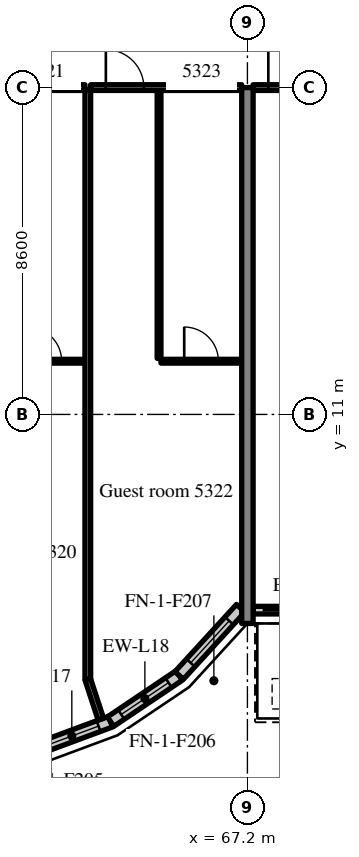
"""IFC4 building model, lengths in metres.
Left out: names, types, materials, properties, quantities, classifications, styles, units other than length and angle.
Written with IfcOpenShell. Run it as: python <this file> out.ifc"""

import sys

from ifc_helpers import new_model, si_unit, direction, frame, frame_2d, origin, place, context, subcontext, project, spatial, rectangle, extrude, source, transform, mapped, element, fill, save


model = new_model("IFC4")
c1 = context("Model", 3, precision=1e-05, world=origin(), true_north=direction((0.0, 1.0)))
c2 = subcontext(c1, "Body", "Model", "MODEL_VIEW")
j1 = project(units=[si_unit("LENGTHUNIT", "METRE"), si_unit("PLANEANGLEUNIT", "RADIAN")], contexts=[c1])
p1 = place(None, origin())
s1 = spatial("IfcSite", under=j1, at=p1, CompositionType="ELEMENT")
p2 = place(p1, origin())
s2 = spatial("IfcBuilding", under=s1, at=p2, CompositionType="ELEMENT")
p3 = place(p2, frame((0.0, 0.0, 221.8)))
s3 = spatial("IfcBuildingStorey", under=s2, at=p3, CompositionType="ELEMENT", Elevation=221.8)
m1 = source(origin(), c2, "Body", "SweptSolid", [
    extrude(rectangle(XDim=14.1, YDim=0.3, at=frame_2d((7.05, 0.0))), origin(), (0.0, 0.0, 1.0), 3.62),
])
p4 = place(p3, frame((67.2, 5.5, 0.0), z_axis=(0.0, 0.0, 1.0), x_axis=(0.0, 1.0, 0.0)))
e1 = element("IfcWall", 1, at=p4, inside=s3, PredefinedType="SHEAR", context=c2, shape_type="MappedRepresentation", body=[
    mapped(m1, transform((0.0, 0.0, 0.0), scale=1.0)),
])
m2 = source(origin(), c2, "Body", "SweptSolid", [
    extrude(rectangle(XDim=2.176, YDim=0.3, at=frame_2d((1.088, 0.0))), origin(), (0.0, 0.0, 1.0), 3.62),
])
p5 = place(p3, frame((61.56, 2.16, 0.0), z_axis=(0.0, 0.0, 1.0), x_axis=(0.937531979054, 0.347899106424, 0.0)))
e2 = element("IfcWall", 2, at=p5, inside=s3, PredefinedType="SOLIDWALL", context=c2, shape_type="MappedRepresentation", body=[
    mapped(m2, transform((0.0, 0.0, 0.0), scale=1.0)),
])
m3 = source(origin(), c2, "Body", "SweptSolid", [
    extrude(rectangle(XDim=1.5, YDim=2.0, at=frame_2d((0.75, 1.0))), frame((0.0, 0.16, 0.0), z_axis=(0.0, -1.0, 0.0), x_axis=(1.0, 0.0, 0.0)), (0.0, 0.0, 1.0), 0.32),
])
p6 = place(p5, frame((0.338, 0.0, 0.9)))
e3 = element("IfcOpeningElement", 3, at=p6, cuts=e2, PredefinedType="OPENING", context=c2, shape_type="MappedRepresentation", body=[
    mapped(m3, transform((0.0, 0.0, 0.0), scale=1.0)),
])
m4 = source(origin(), c2, "Body", "SweptSolid", [
    extrude(rectangle(XDim=2.176, YDim=0.3, at=frame_2d((1.088, 0.0))), origin(), (0.0, 0.0, 1.0), 3.62),
])
p7 = place(p3, frame((63.599, 2.917, 0.0), z_axis=(0.0, 0.0, 1.0), x_axis=(0.829625727223, 0.558319937607, 0.0)))
e4 = element("IfcWall", 4, at=p7, inside=s3, PredefinedType="SOLIDWALL", context=c2, shape_type="MappedRepresentation", body=[
    mapped(m4, transform((0.0, 0.0, 0.0), scale=1.0)),
])
p8 = place(p7, frame((0.338, 0.0, 0.9)))
e5 = element("IfcOpeningElement", 5, at=p8, cuts=e4, PredefinedType="OPENING", context=c2, shape_type="MappedRepresentation", body=[
    mapped(m3, transform((0.0, 0.0, 0.0), scale=1.0)),
])
m5 = source(origin(), c2, "Body", "SweptSolid", [
    extrude(rectangle(XDim=2.398, YDim=0.3, at=frame_2d((1.199, 0.0))), origin(), (0.0, 0.0, 1.0), 3.62),
])
p9 = place(p3, frame((65.404, 4.131, 0.0), z_axis=(0.0, 0.0, 1.0), x_axis=(0.675374189419, 0.737475222815, 0.0)))
e6 = element("IfcWall", 6, at=p9, inside=s3, PredefinedType="SOLIDWALL", context=c2, shape_type="MappedRepresentation", body=[
    mapped(m5, transform((0.0, 0.0, 0.0), scale=1.0)),
])
p10 = place(p9, frame((0.449, 0.0, 0.9)))
e7 = element("IfcOpeningElement", 7, at=p10, cuts=e6, PredefinedType="OPENING", context=c2, shape_type="MappedRepresentation", body=[
    mapped(m3, transform((0.0, 0.0, 0.0), scale=1.0)),
])
m6 = source(origin(), c2, "Body", "SweptSolid", [
    extrude(rectangle(XDim=8.1, YDim=0.2, at=frame_2d((4.05, 0.0))), origin(), (0.0, 0.0, 1.0), 3.02),
])
p11 = place(p3, frame((67.35, 5.85, 0.0), z_axis=(0.0, 0.0, 1.0), x_axis=(1.0, 0.0, 0.0)))
e8 = element("IfcWall", 8, at=p11, inside=s3, PredefinedType="SOLIDWALL", context=c2, shape_type="MappedRepresentation", body=[
    mapped(m6, transform((0.0, 0.0, 0.0), scale=1.0)),
])
m7 = source(origin(), c2, "Body", "SweptSolid", [
    extrude(rectangle(XDim=1.2, YDim=2.4, at=frame_2d((0.6, 1.2))), frame((0.0, 0.11, 0.0), z_axis=(0.0, -1.0, 0.0), x_axis=(1.0, 0.0, 0.0)), (0.0, 0.0, 1.0), 0.22),
])
p12 = place(p11, frame((0.25, 0.0, 0.0)))
e9 = element("IfcOpeningElement", 9, at=p12, cuts=e8, PredefinedType="OPENING", context=c2, shape_type="MappedRepresentation", body=[
    mapped(m7, transform((0.0, 0.0, 0.0), scale=1.0)),
])
m8 = source(origin(), c2, "Body", "SweptSolid", [
    extrude(rectangle(XDim=1.5, YDim=1.5, at=frame_2d((0.75, 0.75))), frame((0.0, 0.11, 0.0), z_axis=(0.0, -1.0, 0.0), x_axis=(1.0, 0.0, 0.0)), (0.0, 0.0, 1.0), 0.22),
])
p13 = place(p11, frame((2.3, 0.0, 0.9)))
e10 = element("IfcOpeningElement", 10, at=p13, cuts=e8, PredefinedType="OPENING", context=c2, shape_type="MappedRepresentation", body=[
    mapped(m8, transform((0.0, 0.0, 0.0), scale=1.0)),
])
p14 = place(p11, frame((4.3, 0.0, 0.0)))
e11 = element("IfcOpeningElement", 11, at=p14, cuts=e8, PredefinedType="OPENING", context=c2, shape_type="MappedRepresentation", body=[
    mapped(m7, transform((0.0, 0.0, 0.0), scale=1.0)),
])
p15 = place(p11, frame((6.35, 0.0, 0.9)))
e12 = element("IfcOpeningElement", 12, at=p15, cuts=e8, PredefinedType="OPENING", context=c2, shape_type="MappedRepresentation", body=[
    mapped(m8, transform((0.0, 0.0, 0.0), scale=1.0)),
])
m9 = source(origin(), c2, "Body", "SweptSolid", [
    extrude(rectangle(XDim=2.125, YDim=0.1, at=frame_2d((1.062, 0.0))), origin(), (0.0, 0.0, 1.0), 3.62),
])
p16 = place(p3, frame((60.8, 12.4, 0.0), z_axis=(0.0, 0.0, 1.0), x_axis=(1.0, 0.0, 0.0)))
e13 = element("IfcWall", 13, at=p16, inside=s3, PredefinedType="PARTITIONING", context=c2, shape_type="MappedRepresentation", body=[
    mapped(m9, transform((0.0, 0.0, 0.0), scale=1.0)),
])
m10 = source(origin(), c2, "Body", "SweptSolid", [
    extrude(rectangle(XDim=0.9, YDim=2.1, at=frame_2d((0.45, 1.05))), frame((0.0, 0.06, 0.0), z_axis=(0.0, -1.0, 0.0), x_axis=(1.0, 0.0, 0.0)), (0.0, 0.0, 1.0), 0.12),
])
p17 = place(p16, frame((0.612, 0.0, 0.0)))
e14 = element("IfcOpeningElement", 14, at=p17, cuts=e13, PredefinedType="OPENING", context=c2, shape_type="MappedRepresentation", body=[
    mapped(m10, transform((0.0, 0.0, 0.0), scale=1.0)),
])
m11 = source(origin(), c2, "Body", "SweptSolid", [
    extrude(rectangle(XDim=3.975, YDim=0.15, at=frame_2d((1.988, 0.0))), origin(), (0.0, 0.0, 1.0), 2.92),
])
p18 = place(p3, frame((58.95, 19.6, 0.0), z_axis=(0.0, 0.0, 1.0), x_axis=(1.0, 0.0, 0.0)))
e15 = element("IfcWall", 15, at=p18, inside=s3, PredefinedType="PARTITIONING", context=c2, shape_type="MappedRepresentation", body=[
    mapped(m11, transform((0.0, 0.0, 0.0), scale=1.0)),
])
m12 = source(origin(), c2, "Body", "SweptSolid", [
    extrude(rectangle(XDim=1.0, YDim=2.1, at=frame_2d((0.5, 1.05))), frame((0.0, 0.085, 0.0), z_axis=(0.0, -1.0, 0.0), x_axis=(1.0, 0.0, 0.0)), (0.0, 0.0, 1.0), 0.17),
])
p19 = place(p18, frame((0.4, 0.0, 0.0)))
e16 = element("IfcOpeningElement", 16, at=p19, cuts=e15, PredefinedType="OPENING", context=c2, shape_type="MappedRepresentation", body=[
    mapped(m12, transform((0.0, 0.0, 0.0), scale=1.0)),
])
m13 = source(origin(), c2, "Body", "SweptSolid", [
    extrude(rectangle(XDim=7.05, YDim=0.1, at=frame_2d((3.525, 0.0))), origin(), (0.0, 0.0, 1.0), 3.62),
])
p20 = place(p3, frame((64.875, 12.475, 0.0), z_axis=(0.0, 0.0, 1.0), x_axis=(0.0, 1.0, 0.0)))
e17 = element("IfcWall", 17, at=p20, inside=s3, PredefinedType="PARTITIONING", context=c2, shape_type="MappedRepresentation", body=[
    mapped(m13, transform((0.0, 0.0, 0.0), scale=1.0)),
])
p21 = place(p3, frame((64.925, 12.4, 0.0), z_axis=(0.0, 0.0, 1.0), x_axis=(1.0, 0.0, 0.0)))
e18 = element("IfcWall", 18, at=p21, inside=s3, PredefinedType="PARTITIONING", context=c2, shape_type="MappedRepresentation", body=[
    mapped(m9, transform((0.0, 0.0, 0.0), scale=1.0)),
])
p22 = place(p21, frame((0.612, 0.0, 0.0)))
e19 = element("IfcOpeningElement", 19, at=p22, cuts=e18, PredefinedType="OPENING", context=c2, shape_type="MappedRepresentation", body=[
    mapped(m10, transform((0.0, 0.0, 0.0), scale=1.0)),
])
p23 = place(p3, frame((63.075, 19.6, 0.0), z_axis=(0.0, 0.0, 1.0), x_axis=(1.0, 0.0, 0.0)))
e20 = element("IfcWall", 20, at=p23, inside=s3, PredefinedType="PARTITIONING", context=c2, shape_type="MappedRepresentation", body=[
    mapped(m11, transform((0.0, 0.0, 0.0), scale=1.0)),
])
p24 = place(p23, frame((0.4, 0.0, 0.0)))
e21 = element("IfcOpeningElement", 21, at=p24, cuts=e20, PredefinedType="OPENING", context=c2, shape_type="MappedRepresentation", body=[
    mapped(m12, transform((0.0, 0.0, 0.0), scale=1.0)),
])
m14 = source(origin(), c2, "Body", "SweptSolid", [
    extrude(rectangle(XDim=15.498, YDim=0.15, at=frame_2d((7.749, 0.0))), origin(), (0.0, 0.0, 1.0), 3.62),
])
p25 = place(p3, frame((63.0, 4.027, 0.0), z_axis=(0.0, 0.0, 1.0), x_axis=(0.0, 1.0, 0.0)))
e22 = element("IfcWall", 22, at=p25, inside=s3, PredefinedType="PARTITIONING", context=c2, shape_type="MappedRepresentation", body=[
    mapped(m14, transform((0.0, 0.0, 0.0), scale=1.0)),
])
m15 = source(origin(), c2, "Body", "SweptSolid", [
    extrude(rectangle(XDim=3.975, YDim=0.15, at=frame_2d((1.987, 0.0))), origin(), (0.0, 0.0, 1.0), 2.92),
])
p26 = place(p3, frame((67.35, 19.6, 0.0), z_axis=(0.0, 0.0, 1.0), x_axis=(1.0, 0.0, 0.0)))
e23 = element("IfcWall", 23, at=p26, inside=s3, PredefinedType="PARTITIONING", context=c2, shape_type="MappedRepresentation", body=[
    mapped(m15, transform((0.0, 0.0, 0.0), scale=1.0)),
])
p27 = place(p26, frame((0.4, 0.0, 0.0)))
e24 = element("IfcOpeningElement", 24, at=p27, cuts=e23, PredefinedType="OPENING", context=c2, shape_type="MappedRepresentation", body=[
    mapped(m12, transform((0.0, 0.0, 0.0), scale=1.0)),
])
m16 = source(origin(), c2, "Body", "SweptSolid", [
    extrude(rectangle(XDim=1.101, YDim=0.15, at=frame_2d((0.55, 0.0))), origin(), (0.0, 0.0, 1.0), 3.62),
])
p28 = place(p3, frame((63.343, 2.981, 0.0), z_axis=(0.0, 0.0, 1.0), x_axis=(-0.311567081539, 0.950224159712, 0.0)))
e25 = element("IfcWall", 25, at=p28, inside=s3, PredefinedType="PARTITIONING", context=c2, shape_type="MappedRepresentation", body=[
    mapped(m16, transform((0.0, 0.0, 0.0), scale=1.0)),
])
m17 = source(origin(), c2, "Body", "SweptSolid", [
    extrude(rectangle(XDim=1.5, YDim=2.0, at=frame_2d((0.75, 1.0))), frame((0.0, 0.03, 0.0), z_axis=(0.0, -1.0, 0.0), x_axis=(1.0, 0.0, 0.0)), (0.0, 0.0, 1.0), 0.06),
])
p29 = place(p6, origin())
e26 = element("IfcWindow", 26, at=p29, inside=s3, PartitioningType="SINGLE_PANEL", PredefinedType="WINDOW", context=c2, shape_type="MappedRepresentation", body=[
    mapped(m17, transform((0.0, 0.0, 0.0), scale=1.0)),
])
fill(e3, e26)
p30 = place(p8, origin())
e27 = element("IfcWindow", 27, at=p30, inside=s3, PartitioningType="SINGLE_PANEL", PredefinedType="WINDOW", context=c2, shape_type="MappedRepresentation", body=[
    mapped(m17, transform((0.0, 0.0, 0.0), scale=1.0)),
])
fill(e5, e27)
p31 = place(p10, origin())
e28 = element("IfcWindow", 28, at=p31, inside=s3, PartitioningType="SINGLE_PANEL", PredefinedType="WINDOW", context=c2, shape_type="MappedRepresentation", body=[
    mapped(m17, transform((0.0, 0.0, 0.0), scale=1.0)),
])
fill(e7, e28)
m18 = source(origin(), c2, "Body", "SweptSolid", [
    extrude(rectangle(XDim=1.2, YDim=2.4, at=frame_2d((0.6, 1.2))), frame((0.0, 0.025, 0.0), z_axis=(0.0, -1.0, 0.0), x_axis=(1.0, 0.0, 0.0)), (0.0, 0.0, 1.0), 0.05),
])
p32 = place(p12, origin())
e29 = element("IfcDoor", 29, at=p32, inside=s3, OperationType="SLIDING_TO_LEFT", PredefinedType="DOOR", context=c2, shape_type="MappedRepresentation", body=[
    mapped(m18, transform((0.0, 0.0, 0.0), scale=1.0)),
])
fill(e9, e29)
m19 = source(origin(), c2, "Body", "SweptSolid", [
    extrude(rectangle(XDim=0.9, YDim=2.1, at=frame_2d((0.45, 1.05))), frame((0.0, 0.025, 0.0), z_axis=(0.0, -1.0, 0.0), x_axis=(1.0, 0.0, 0.0)), (0.0, 0.0, 1.0), 0.05),
])
p33 = place(p17, origin())
e30 = element("IfcDoor", 30, at=p33, inside=s3, OperationType="SINGLE_SWING_LEFT", PredefinedType="DOOR", context=c2, shape_type="MappedRepresentation", body=[
    mapped(m19, transform((0.0, 0.0, 0.0), scale=1.0)),
])
fill(e14, e30)
p34 = place(p22, origin())
e31 = element("IfcDoor", 31, at=p34, inside=s3, OperationType="SINGLE_SWING_LEFT", PredefinedType="DOOR", context=c2, shape_type="MappedRepresentation", body=[
    mapped(m19, transform((0.0, 0.0, 0.0), scale=1.0)),
])
fill(e19, e31)
m20 = source(origin(), c2, "Body", "SweptSolid", [
    extrude(rectangle(XDim=1.0, YDim=2.1, at=frame_2d((0.5, 1.05))), frame((0.0, 0.025, 0.0), z_axis=(0.0, -1.0, 0.0), x_axis=(1.0, 0.0, 0.0)), (0.0, 0.0, 1.0), 0.05),
])
p35 = place(p24, origin())
e32 = element("IfcDoor", 32, at=p35, inside=s3, OperationType="SINGLE_SWING_LEFT", PredefinedType="DOOR", context=c2, shape_type="MappedRepresentation", body=[
    mapped(m20, transform((0.0, 0.0, 0.0), scale=1.0)),
])
fill(e21, e32)
p36 = place(p27, origin())
e33 = element("IfcDoor", 33, at=p36, inside=s3, OperationType="SINGLE_SWING_LEFT", PredefinedType="DOOR", context=c2, shape_type="MappedRepresentation", body=[
    mapped(m20, transform((0.0, 0.0, 0.0), scale=1.0)),
])
fill(e24, e33)
save(model, sys.argv[1])
